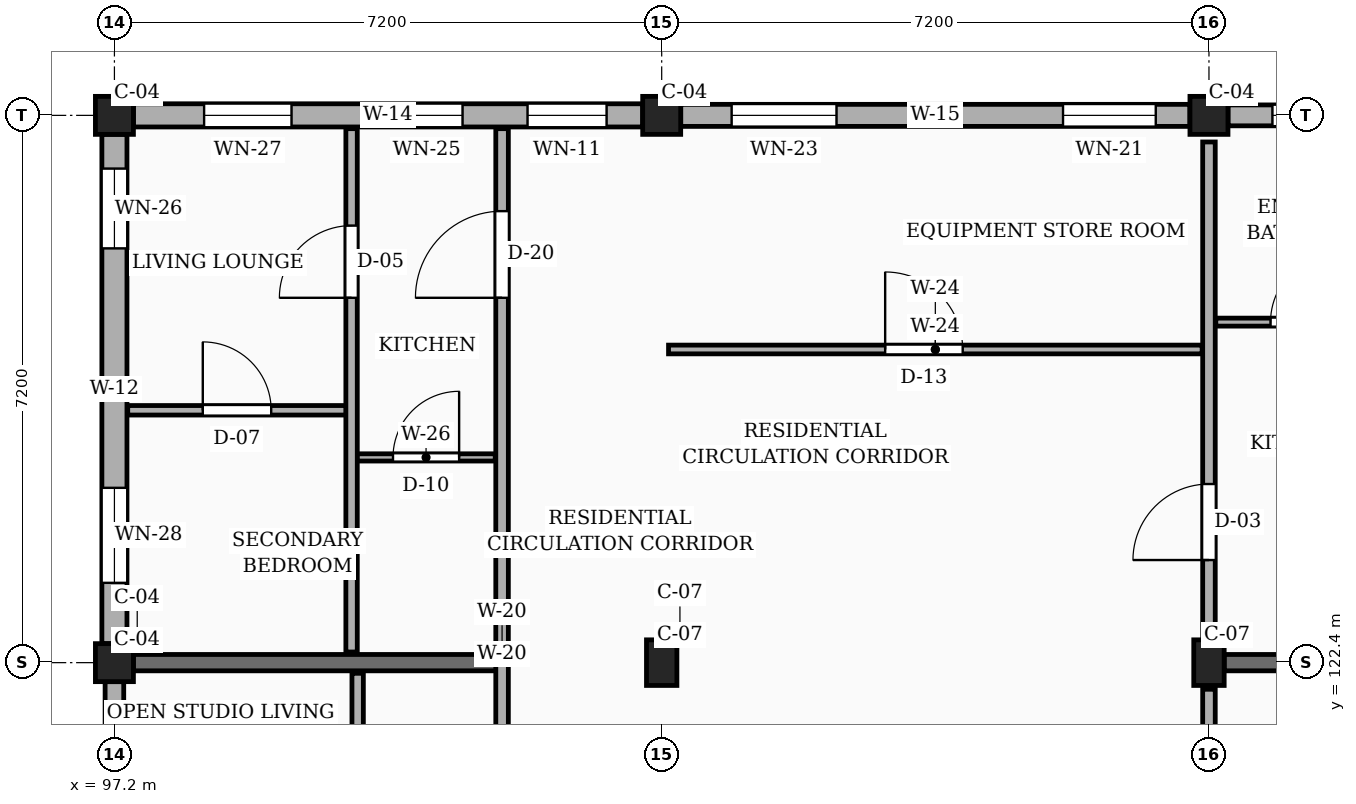
"""IFC4 building model, lengths in metres.
Left out: names, types, materials, properties, quantities, classifications, styles, units other than length and angle.
Written with IfcOpenShell. Run it as: python <this file> out.ifc"""

import sys

from ifc_helpers import new_model, si_unit, direction, frame, frame_2d, origin, origin_2d, place, context, subcontext, project, spatial, rectangle, extrude, element, fill, save


model = new_model("IFC4")
c1 = context("Model", 3, precision=1e-05, world=origin(), true_north=direction((0.0, 1.0)))
c2 = subcontext(c1, "Body", "Model", "MODEL_VIEW")
j1 = project(units=[si_unit("LENGTHUNIT", "METRE"), si_unit("PLANEANGLEUNIT", "RADIAN")], contexts=[c1])
p1 = place(None, origin())
s1 = spatial("IfcSite", under=j1, at=p1, CompositionType="ELEMENT")
p2 = place(p1, origin())
s2 = spatial("IfcBuilding", under=s1, at=p2, CompositionType="ELEMENT")
p3 = place(p2, frame((0.0, 0.0, 29.7)))
s3 = spatial("IfcBuildingStorey", under=s2, at=p3, CompositionType="ELEMENT", Elevation=29.7)
for number, where, z_axis, x_axis in (
    (1, (97.2, 122.4, 0.0), (0.0, 0.0, 1.0), (1.0, 0.0, 0.0)),
    (2, (97.2, 129.6, 0.0), (0.0, 0.0, 1.0), (1.0, 0.0, 0.0)),
):
    element("IfcColumn", number, at=place(p3, frame(where, z_axis=z_axis, x_axis=x_axis)), inside=s3, PredefinedType="COLUMN", context=c2, shape_type="SweptSolid", body=[
        extrude(rectangle(XDim=0.5, YDim=0.5, at=origin_2d()), origin(), (0.0, 0.0, 1.0), 3.15),
    ])
p4 = place(p3, frame((104.4, 122.4, 0.0), z_axis=(0.0, 0.0, 1.0), x_axis=(1.0, 0.0, 0.0)))
e3 = element("IfcColumn", 3, at=p4, inside=s3, PredefinedType="COLUMN", context=c2, shape_type="SweptSolid", body=[
    extrude(rectangle(XDim=0.4, YDim=0.6, at=origin_2d()), origin(), (0.0, 0.0, 1.0), 3.15),
])
p5 = place(p3, frame((104.4, 129.6, 0.0), z_axis=(0.0, 0.0, 1.0), x_axis=(1.0, 0.0, 0.0)))
e4 = element("IfcColumn", 4, at=p5, inside=s3, PredefinedType="COLUMN", context=c2, shape_type="SweptSolid", body=[
    extrude(rectangle(XDim=0.5, YDim=0.5, at=origin_2d()), origin(), (0.0, 0.0, 1.0), 3.15),
])
p6 = place(p3, frame((111.6, 122.4, 0.0), z_axis=(0.0, 0.0, 1.0), x_axis=(1.0, 0.0, 0.0)))
e5 = element("IfcColumn", 5, at=p6, inside=s3, PredefinedType="COLUMN", context=c2, shape_type="SweptSolid", body=[
    extrude(rectangle(XDim=0.4, YDim=0.6, at=origin_2d()), origin(), (0.0, 0.0, 1.0), 3.15),
])
p7 = place(p3, frame((111.6, 129.6, 0.0), z_axis=(0.0, 0.0, 1.0), x_axis=(1.0, 0.0, 0.0)))
e6 = element("IfcColumn", 6, at=p7, inside=s3, PredefinedType="COLUMN", context=c2, shape_type="SweptSolid", body=[
    extrude(rectangle(XDim=0.5, YDim=0.5, at=origin_2d()), origin(), (0.0, 0.0, 1.0), 3.15),
])
p8 = place(p3, frame((97.45, 122.4, 0.0), z_axis=(0.0, 0.0, 1.0), x_axis=(1.0, 0.0, 0.0)))
e7 = element("IfcWall", 7, at=p8, inside=s3, PredefinedType="SOLIDWALL", context=c2, shape_type="SweptSolid", body=[
    extrude(rectangle(XDim=4.85, YDim=0.215, at=frame_2d((2.425, 0.0))), origin(), (0.0, 0.0, 1.0), 2.19),
])
p9 = place(p3, frame((111.8, 122.4, 0.0), z_axis=(0.0, 0.0, 1.0), x_axis=(1.0, 0.0, 0.0)))
e8 = element("IfcWall", 8, at=p9, inside=s3, PredefinedType="SOLIDWALL", context=c2, shape_type="SweptSolid", body=[
    extrude(rectangle(XDim=6.75, YDim=0.215, at=frame_2d((3.375, 0.0))), origin(), (0.0, 0.0, 1.0), 2.19),
])
p10 = place(p3, frame((118.55, 129.6, 0.0), z_axis=(0.0, 0.0, 1.0), x_axis=(-1.0, 0.0, 0.0)))
e9 = element("IfcWall", 9, at=p10, inside=s3, PredefinedType="SOLIDWALL", context=c2, shape_type="SweptSolid", body=[
    extrude(rectangle(XDim=6.7, YDim=0.275, at=frame_2d((3.35, 0.0))), origin(), (0.0, 0.0, 1.0), 2.46),
])
p11 = place(p10, frame((1.765, 0.0, 0.78)))
e10 = element("IfcOpeningElement", 10, at=p11, cuts=e9, PredefinedType="OPENING", context=c2, shape_type="SweptSolid", body=[
    extrude(rectangle(XDim=1.06, YDim=1.36, at=frame_2d((0.53, 0.68))), frame((0.0, 0.147, 0.0), z_axis=(0.0, -1.0, 0.0), x_axis=(1.0, 0.0, 0.0)), (0.0, 0.0, 1.0), 0.295),
])
p12 = place(p10, frame((4.895, 0.0, 0.78)))
e11 = element("IfcOpeningElement", 11, at=p12, cuts=e9, PredefinedType="OPENING", context=c2, shape_type="SweptSolid", body=[
    extrude(rectangle(XDim=1.22, YDim=1.36, at=frame_2d((0.61, 0.68))), frame((0.0, 0.147, 0.0), z_axis=(0.0, -1.0, 0.0), x_axis=(1.0, 0.0, 0.0)), (0.0, 0.0, 1.0), 0.295),
])
p13 = place(p3, frame((111.35, 129.6, 0.0), z_axis=(0.0, 0.0, 1.0), x_axis=(-1.0, 0.0, 0.0)))
e12 = element("IfcWall", 12, at=p13, inside=s3, PredefinedType="SOLIDWALL", context=c2, shape_type="SweptSolid", body=[
    extrude(rectangle(XDim=6.7, YDim=0.29, at=frame_2d((3.35, 0.0))), origin(), (0.0, 0.0, 1.0), 2.46),
])
p14 = place(p13, frame((0.45, 0.0, 0.78)))
e13 = element("IfcOpeningElement", 13, at=p14, cuts=e12, PredefinedType="OPENING", context=c2, shape_type="SweptSolid", body=[
    extrude(rectangle(XDim=1.22, YDim=1.36, at=frame_2d((0.61, 0.68))), frame((0.0, 0.155, 0.0), z_axis=(0.0, -1.0, 0.0), x_axis=(1.0, 0.0, 0.0)), (0.0, 0.0, 1.0), 0.31),
])
p15 = place(p13, frame((4.65, 0.0, 0.78)))
e14 = element("IfcOpeningElement", 14, at=p15, cuts=e12, PredefinedType="OPENING", context=c2, shape_type="SweptSolid", body=[
    extrude(rectangle(XDim=1.38, YDim=1.36, at=frame_2d((0.69, 0.68))), frame((0.0, 0.155, 0.0), z_axis=(0.0, -1.0, 0.0), x_axis=(1.0, 0.0, 0.0)), (0.0, 0.0, 1.0), 0.31),
])
p16 = place(p3, frame((104.15, 129.6, 0.0), z_axis=(0.0, 0.0, 1.0), x_axis=(-1.0, 0.0, 0.0)))
e15 = element("IfcWall", 15, at=p16, inside=s3, PredefinedType="SOLIDWALL", context=c2, shape_type="SweptSolid", body=[
    extrude(rectangle(XDim=6.7, YDim=0.305, at=frame_2d((3.35, 0.0))), origin(), (0.0, 0.0, 1.0), 2.46),
])
p17 = place(p16, frame((0.475, 0.0, 0.78)))
e16 = element("IfcOpeningElement", 16, at=p17, cuts=e15, PredefinedType="OPENING", context=c2, shape_type="SweptSolid", body=[
    extrude(rectangle(XDim=1.04, YDim=1.26, at=frame_2d((0.52, 0.63))), frame((0.0, 0.163, 0.0), z_axis=(0.0, -1.0, 0.0), x_axis=(1.0, 0.0, 0.0)), (0.0, 0.0, 1.0), 0.325),
])
p18 = place(p16, frame((2.37, 0.0, 0.78)))
e17 = element("IfcOpeningElement", 17, at=p18, cuts=e15, PredefinedType="OPENING", context=c2, shape_type="SweptSolid", body=[
    extrude(rectangle(XDim=0.94, YDim=1.44, at=frame_2d((0.47, 0.72))), frame((0.0, 0.163, 0.0), z_axis=(0.0, -1.0, 0.0), x_axis=(1.0, 0.0, 0.0)), (0.0, 0.0, 1.0), 0.325),
])
p19 = place(p16, frame((4.62, 0.0, 0.78)))
e18 = element("IfcOpeningElement", 18, at=p19, cuts=e15, PredefinedType="OPENING", context=c2, shape_type="SweptSolid", body=[
    extrude(rectangle(XDim=1.15, YDim=1.44, at=frame_2d((0.575, 0.72))), frame((0.0, 0.163, 0.0), z_axis=(0.0, -1.0, 0.0), x_axis=(1.0, 0.0, 0.0)), (0.0, 0.0, 1.0), 0.325),
])
p20 = place(p3, frame((97.2, 129.35, 0.0), z_axis=(0.0, 0.0, 1.0), x_axis=(0.0, -1.0, 0.0)))
e19 = element("IfcWall", 19, at=p20, inside=s3, PredefinedType="SOLIDWALL", context=c2, shape_type="SweptSolid", body=[
    extrude(rectangle(XDim=6.7, YDim=0.33, at=frame_2d((3.35, 0.0))), origin(), (0.0, 0.0, 1.0), 2.46),
])
p21 = place(p20, frame((0.45, 0.0, 0.78)))
e20 = element("IfcOpeningElement", 20, at=p21, cuts=e19, PredefinedType="OPENING", context=c2, shape_type="SweptSolid", body=[
    extrude(rectangle(XDim=1.05, YDim=1.44, at=frame_2d((0.525, 0.72))), frame((0.0, 0.175, 0.0), z_axis=(0.0, -1.0, 0.0), x_axis=(1.0, 0.0, 0.0)), (0.0, 0.0, 1.0), 0.35),
])
p22 = place(p20, frame((4.65, 0.0, 0.78)))
e21 = element("IfcOpeningElement", 21, at=p22, cuts=e19, PredefinedType="OPENING", context=c2, shape_type="SweptSolid", body=[
    extrude(rectangle(XDim=1.25, YDim=1.44, at=frame_2d((0.625, 0.72))), frame((0.0, 0.175, 0.0), z_axis=(0.0, -1.0, 0.0), x_axis=(1.0, 0.0, 0.0)), (0.0, 0.0, 1.0), 0.35),
])
p23 = place(p3, frame((97.2, 122.15, 0.0), z_axis=(0.0, 0.0, 1.0), x_axis=(0.0, -1.0, 0.0)))
e22 = element("IfcWall", 22, at=p23, inside=s3, PredefinedType="SOLIDWALL", context=c2, shape_type="SweptSolid", body=[
    extrude(rectangle(XDim=6.7, YDim=0.245, at=frame_2d((3.35, 0.0))), origin(), (0.0, 0.0, 1.0), 2.46),
])
p24 = place(p23, frame((0.45, 0.0, 0.78)))
e23 = element("IfcOpeningElement", 23, at=p24, cuts=e22, PredefinedType="OPENING", context=c2, shape_type="SweptSolid", body=[
    extrude(rectangle(XDim=1.25, YDim=1.44, at=frame_2d((0.625, 0.72))), frame((0.0, 0.133, 0.0), z_axis=(0.0, -1.0, 0.0), x_axis=(1.0, 0.0, 0.0)), (0.0, 0.0, 1.0), 0.265),
])
p25 = place(p23, frame((4.65, 0.0, 0.78)))
e24 = element("IfcOpeningElement", 24, at=p25, cuts=e22, PredefinedType="OPENING", context=c2, shape_type="SweptSolid", body=[
    extrude(rectangle(XDim=1.45, YDim=1.44, at=frame_2d((0.725, 0.72))), frame((0.0, 0.133, 0.0), z_axis=(0.0, -1.0, 0.0), x_axis=(1.0, 0.0, 0.0)), (0.0, 0.0, 1.0), 0.265),
])
p26 = place(p3, frame((102.3, 115.22, 0.0), z_axis=(0.0, 0.0, 1.0), x_axis=(0.0, 1.0, 0.0)))
e25 = element("IfcWall", 25, at=p26, inside=s3, PredefinedType="PARTITIONING", context=c2, shape_type="SweptSolid", body=[
    extrude(rectangle(XDim=7.16, YDim=0.165, at=frame_2d((3.58, 0.0))), origin(), (0.0, 0.0, 1.0), 2.325),
])
p27 = place(p26, frame((4.78, 0.0, 0.0)))
e26 = element("IfcOpeningElement", 26, at=p27, cuts=e25, PredefinedType="OPENING", context=c2, shape_type="SweptSolid", body=[
    extrude(rectangle(XDim=0.94, YDim=2.12, at=frame_2d((0.47, 1.06))), frame((0.0, 0.093, 0.0), z_axis=(0.0, -1.0, 0.0), x_axis=(1.0, 0.0, 0.0)), (0.0, 0.0, 1.0), 0.185),
])
p28 = place(p3, frame((102.3, 122.42, 0.0), z_axis=(0.0, 0.0, 1.0), x_axis=(0.0, 1.0, 0.0)))
e27 = element("IfcWall", 27, at=p28, inside=s3, PredefinedType="PARTITIONING", context=c2, shape_type="SweptSolid", body=[
    extrude(rectangle(XDim=7.005, YDim=0.165, at=frame_2d((3.502, 0.0))), origin(), (0.0, 0.0, 1.0), 2.325),
])
p29 = place(p28, frame((4.78, 0.0, 0.0)))
e28 = element("IfcOpeningElement", 28, at=p29, cuts=e27, PredefinedType="OPENING", context=c2, shape_type="SweptSolid", body=[
    extrude(rectangle(XDim=1.14, YDim=2.18, at=frame_2d((0.57, 1.09))), frame((0.0, 0.093, 0.0), z_axis=(0.0, -1.0, 0.0), x_axis=(1.0, 0.0, 0.0)), (0.0, 0.0, 1.0), 0.185),
])
p30 = place(p3, frame((111.6, 115.55, 0.0), z_axis=(0.0, 0.0, 1.0), x_axis=(0.0, 1.0, 0.0)))
e29 = element("IfcWall", 29, at=p30, inside=s3, PredefinedType="PARTITIONING", context=c2, shape_type="SweptSolid", body=[
    extrude(rectangle(XDim=6.5, YDim=0.165, at=frame_2d((3.25, 0.0))), origin(), (0.0, 0.0, 1.0), 2.325),
])
p31 = place(p30, frame((1.1, 0.0, 0.0)))
e30 = element("IfcOpeningElement", 30, at=p31, cuts=e29, PredefinedType="OPENING", context=c2, shape_type="SweptSolid", body=[
    extrude(rectangle(XDim=1.14, YDim=2.18, at=frame_2d((0.57, 1.09))), frame((0.0, 0.093, 0.0), z_axis=(0.0, -1.0, 0.0), x_axis=(1.0, 0.0, 0.0)), (0.0, 0.0, 1.0), 0.185),
])
p32 = place(p3, frame((111.6, 122.75, 0.0), z_axis=(0.0, 0.0, 1.0), x_axis=(0.0, 1.0, 0.0)))
e31 = element("IfcWall", 31, at=p32, inside=s3, PredefinedType="PARTITIONING", context=c2, shape_type="SweptSolid", body=[
    extrude(rectangle(XDim=6.5, YDim=0.165, at=frame_2d((3.25, 0.0))), origin(), (0.0, 0.0, 1.0), 2.325),
])
p33 = place(p32, frame((1.0, 0.0, 0.0)))
e32 = element("IfcOpeningElement", 32, at=p33, cuts=e31, PredefinedType="OPENING", context=c2, shape_type="SweptSolid", body=[
    extrude(rectangle(XDim=1.0, YDim=2.15, at=frame_2d((0.5, 1.075))), frame((0.0, 0.093, 0.0), z_axis=(0.0, -1.0, 0.0), x_axis=(1.0, 0.0, 0.0)), (0.0, 0.0, 1.0), 0.185),
])
p34 = place(p3, frame((100.4, 115.34, 0.0), z_axis=(0.0, 0.0, 1.0), x_axis=(0.0, 1.0, 0.0)))
e33 = element("IfcWall", 33, at=p34, inside=s3, PredefinedType="PARTITIONING", context=c2, shape_type="SweptSolid", body=[
    extrude(rectangle(XDim=6.92, YDim=0.15, at=frame_2d((3.46, 0.0))), origin(), (0.0, 0.0, 1.0), 2.325),
])
p35 = place(p34, frame((4.66, 0.0, 0.0)))
e34 = element("IfcOpeningElement", 34, at=p35, cuts=e33, PredefinedType="OPENING", context=c2, shape_type="SweptSolid", body=[
    extrude(rectangle(XDim=0.92, YDim=2.1, at=frame_2d((0.46, 1.05))), frame((0.0, 0.085, 0.0), z_axis=(0.0, -1.0, 0.0), x_axis=(1.0, 0.0, 0.0)), (0.0, 0.0, 1.0), 0.17),
])
p36 = place(p3, frame((104.49, 126.52, 0.0), z_axis=(0.0, 0.0, 1.0), x_axis=(1.0, 0.0, 0.0)))
e35 = element("IfcWall", 35, at=p36, inside=s3, PredefinedType="PARTITIONING", context=c2, shape_type="SweptSolid", body=[
    extrude(rectangle(XDim=7.02, YDim=0.115, at=frame_2d((3.51, 0.0))), origin(), (0.0, 0.0, 1.0), 2.325),
])
p37 = place(p36, frame((2.85, 0.0, 0.0)))
e36 = element("IfcOpeningElement", 36, at=p37, cuts=e35, PredefinedType="OPENING", context=c2, shape_type="SweptSolid", body=[
    extrude(rectangle(XDim=1.02, YDim=2.15, at=frame_2d((0.51, 1.075))), frame((0.0, 0.067, 0.0), z_axis=(0.0, -1.0, 0.0), x_axis=(1.0, 0.0, 0.0)), (0.0, 0.0, 1.0), 0.135),
])
p38 = place(p3, frame((97.375, 125.72, 0.0), z_axis=(0.0, 0.0, 1.0), x_axis=(1.0, 0.0, 0.0)))
e37 = element("IfcWall", 37, at=p38, inside=s3, PredefinedType="PARTITIONING", context=c2, shape_type="SweptSolid", body=[
    extrude(rectangle(XDim=2.875, YDim=0.125, at=frame_2d((1.438, 0.0))), origin(), (0.0, 0.0, 1.0), 2.325),
])
p39 = place(p38, frame((0.988, 0.0, 0.0)))
e38 = element("IfcOpeningElement", 38, at=p39, cuts=e37, PredefinedType="OPENING", context=c2, shape_type="SweptSolid", body=[
    extrude(rectangle(XDim=0.9, YDim=2.1, at=frame_2d((0.45, 1.05))), frame((0.0, 0.073, 0.0), z_axis=(0.0, -1.0, 0.0), x_axis=(1.0, 0.0, 0.0)), (0.0, 0.0, 1.0), 0.145),
])
p40 = place(p3, frame((100.39, 125.1, 0.0), z_axis=(0.0, 0.0, 1.0), x_axis=(1.0, 0.0, 0.0)))
e39 = element("IfcWall", 39, at=p40, inside=s3, PredefinedType="PARTITIONING", context=c2, shape_type="SweptSolid", body=[
    extrude(rectangle(XDim=1.82, YDim=0.095, at=frame_2d((0.91, 0.0))), origin(), (0.0, 0.0, 1.0), 2.325),
])
p41 = place(p40, frame((0.475, 0.0, 0.0)))
e40 = element("IfcOpeningElement", 40, at=p41, cuts=e39, PredefinedType="OPENING", context=c2, shape_type="SweptSolid", body=[
    extrude(rectangle(XDim=0.87, YDim=2.05, at=frame_2d((0.435, 1.025))), frame((0.0, 0.058, 0.0), z_axis=(0.0, -1.0, 0.0), x_axis=(1.0, 0.0, 0.0)), (0.0, 0.0, 1.0), 0.115),
])
p42 = place(p3, frame((100.32, 122.54, 0.0), z_axis=(0.0, 0.0, 1.0), x_axis=(0.0, 1.0, 0.0)))
e41 = element("IfcWall", 41, at=p42, inside=s3, PredefinedType="PARTITIONING", context=c2, shape_type="SweptSolid", body=[
    extrude(rectangle(XDim=6.885, YDim=0.15, at=frame_2d((3.442, 0.0))), origin(), (0.0, 0.0, 1.0), 2.325),
])
p43 = place(p42, frame((4.66, 0.0, 0.0)))
e42 = element("IfcOpeningElement", 42, at=p43, cuts=e41, PredefinedType="OPENING", context=c2, shape_type="SweptSolid", body=[
    extrude(rectangle(XDim=0.95, YDim=2.1, at=frame_2d((0.475, 1.05))), frame((0.0, 0.085, 0.0), z_axis=(0.0, -1.0, 0.0), x_axis=(1.0, 0.0, 0.0)), (0.0, 0.0, 1.0), 0.17),
])
p44 = place(p3, frame((111.69, 126.88, 0.0), z_axis=(0.0, 0.0, 1.0), x_axis=(1.0, 0.0, 0.0)))
e43 = element("IfcWall", 43, at=p44, inside=s3, PredefinedType="PARTITIONING", context=c2, shape_type="SweptSolid", body=[
    extrude(rectangle(XDim=2.34, YDim=0.105, at=frame_2d((1.17, 0.0))), origin(), (0.0, 0.0, 1.0), 2.325),
])
p45 = place(p44, frame((0.72, 0.0, 0.0)))
e44 = element("IfcOpeningElement", 44, at=p45, cuts=e43, PredefinedType="OPENING", context=c2, shape_type="SweptSolid", body=[
    extrude(rectangle(XDim=0.9, YDim=2.05, at=frame_2d((0.45, 1.025))), frame((0.0, 0.062, 0.0), z_axis=(0.0, -1.0, 0.0), x_axis=(1.0, 0.0, 0.0)), (0.0, 0.0, 1.0), 0.125),
])
p46 = place(p12, origin())
e45 = element("IfcWindow", 45, at=p46, inside=s3, PartitioningType="SINGLE_PANEL", PredefinedType="WINDOW", context=c2, shape_type="SweptSolid", body=[
    extrude(rectangle(XDim=1.22, YDim=1.36, at=frame_2d((0.61, 0.68))), frame((0.0, 0.03, 0.0), z_axis=(0.0, -1.0, 0.0), x_axis=(1.0, 0.0, 0.0)), (0.0, 0.0, 1.0), 0.06),
])
fill(e11, e45)
p47 = place(p14, origin())
e46 = element("IfcWindow", 46, at=p47, inside=s3, PartitioningType="SINGLE_PANEL", PredefinedType="WINDOW", context=c2, shape_type="SweptSolid", body=[
    extrude(rectangle(XDim=1.22, YDim=1.36, at=frame_2d((0.61, 0.68))), frame((0.0, 0.03, 0.0), z_axis=(0.0, -1.0, 0.0), x_axis=(1.0, 0.0, 0.0)), (0.0, 0.0, 1.0), 0.06),
])
fill(e13, e46)
p48 = place(p15, origin())
e47 = element("IfcWindow", 47, at=p48, inside=s3, PartitioningType="SINGLE_PANEL", PredefinedType="WINDOW", context=c2, shape_type="SweptSolid", body=[
    extrude(rectangle(XDim=1.38, YDim=1.36, at=frame_2d((0.69, 0.68))), frame((0.0, 0.03, 0.0), z_axis=(0.0, -1.0, 0.0), x_axis=(1.0, 0.0, 0.0)), (0.0, 0.0, 1.0), 0.06),
])
fill(e14, e47)
p49 = place(p17, origin())
e48 = element("IfcWindow", 48, at=p49, inside=s3, PartitioningType="SINGLE_PANEL", PredefinedType="WINDOW", context=c2, shape_type="SweptSolid", body=[
    extrude(rectangle(XDim=1.04, YDim=1.26, at=frame_2d((0.52, 0.63))), frame((0.0, 0.03, 0.0), z_axis=(0.0, -1.0, 0.0), x_axis=(1.0, 0.0, 0.0)), (0.0, 0.0, 1.0), 0.06),
])
fill(e16, e48)
p50 = place(p18, origin())
e49 = element("IfcWindow", 49, at=p50, inside=s3, PartitioningType="SINGLE_PANEL", PredefinedType="WINDOW", context=c2, shape_type="SweptSolid", body=[
    extrude(rectangle(XDim=0.94, YDim=1.44, at=frame_2d((0.47, 0.72))), frame((0.0, 0.03, 0.0), z_axis=(0.0, -1.0, 0.0), x_axis=(1.0, 0.0, 0.0)), (0.0, 0.0, 1.0), 0.06),
])
fill(e17, e49)
p51 = place(p19, origin())
e50 = element("IfcWindow", 50, at=p51, inside=s3, PartitioningType="SINGLE_PANEL", PredefinedType="WINDOW", context=c2, shape_type="SweptSolid", body=[
    extrude(rectangle(XDim=1.15, YDim=1.44, at=frame_2d((0.575, 0.72))), frame((0.0, 0.03, 0.0), z_axis=(0.0, -1.0, 0.0), x_axis=(1.0, 0.0, 0.0)), (0.0, 0.0, 1.0), 0.06),
])
fill(e18, e50)
p52 = place(p21, origin())
e51 = element("IfcWindow", 51, at=p52, inside=s3, PartitioningType="SINGLE_PANEL", PredefinedType="WINDOW", context=c2, shape_type="SweptSolid", body=[
    extrude(rectangle(XDim=1.05, YDim=1.44, at=frame_2d((0.525, 0.72))), frame((0.0, 0.03, 0.0), z_axis=(0.0, -1.0, 0.0), x_axis=(1.0, 0.0, 0.0)), (0.0, 0.0, 1.0), 0.06),
])
fill(e20, e51)
p53 = place(p22, origin())
e52 = element("IfcWindow", 52, at=p53, inside=s3, PartitioningType="SINGLE_PANEL", PredefinedType="WINDOW", context=c2, shape_type="SweptSolid", body=[
    extrude(rectangle(XDim=1.25, YDim=1.44, at=frame_2d((0.625, 0.72))), frame((0.0, 0.03, 0.0), z_axis=(0.0, -1.0, 0.0), x_axis=(1.0, 0.0, 0.0)), (0.0, 0.0, 1.0), 0.06),
])
fill(e21, e52)
p54 = place(p24, origin())
e53 = element("IfcWindow", 53, at=p54, inside=s3, PartitioningType="SINGLE_PANEL", PredefinedType="WINDOW", context=c2, shape_type="SweptSolid", body=[
    extrude(rectangle(XDim=1.25, YDim=1.44, at=frame_2d((0.625, 0.72))), frame((0.0, 0.03, 0.0), z_axis=(0.0, -1.0, 0.0), x_axis=(1.0, 0.0, 0.0)), (0.0, 0.0, 1.0), 0.06),
])
fill(e23, e53)
p55 = place(p29, origin())
e54 = element("IfcDoor", 54, at=p55, inside=s3, OperationType="SINGLE_SWING_LEFT", PredefinedType="DOOR", context=c2, shape_type="SweptSolid", body=[
    extrude(rectangle(XDim=1.14, YDim=2.18, at=frame_2d((0.57, 1.09))), frame((0.0, 0.025, 0.0), z_axis=(0.0, -1.0, 0.0), x_axis=(1.0, 0.0, 0.0)), (0.0, 0.0, 1.0), 0.05),
])
fill(e28, e54)
p56 = place(p33, origin())
e55 = element("IfcDoor", 55, at=p56, inside=s3, OperationType="SINGLE_SWING_LEFT", PredefinedType="DOOR", context=c2, shape_type="SweptSolid", body=[
    extrude(rectangle(XDim=1.0, YDim=2.15, at=frame_2d((0.5, 1.075))), frame((0.0, 0.025, 0.0), z_axis=(0.0, -1.0, 0.0), x_axis=(1.0, 0.0, 0.0)), (0.0, 0.0, 1.0), 0.05),
])
fill(e32, e55)
p57 = place(p37, origin())
e56 = element("IfcDoor", 56, at=p57, inside=s3, OperationType="SINGLE_SWING_LEFT", PredefinedType="DOOR", context=c2, shape_type="SweptSolid", body=[
    extrude(rectangle(XDim=1.02, YDim=2.15, at=frame_2d((0.51, 1.075))), frame((0.0, 0.025, 0.0), z_axis=(0.0, -1.0, 0.0), x_axis=(1.0, 0.0, 0.0)), (0.0, 0.0, 1.0), 0.05),
])
fill(e36, e56)
p58 = place(p39, origin())
e57 = element("IfcDoor", 57, at=p58, inside=s3, OperationType="SINGLE_SWING_LEFT", PredefinedType="DOOR", context=c2, shape_type="SweptSolid", body=[
    extrude(rectangle(XDim=0.9, YDim=2.1, at=frame_2d((0.45, 1.05))), frame((0.0, 0.025, 0.0), z_axis=(0.0, -1.0, 0.0), x_axis=(1.0, 0.0, 0.0)), (0.0, 0.0, 1.0), 0.05),
])
fill(e38, e57)
p59 = place(p41, origin())
e58 = element("IfcDoor", 58, at=p59, inside=s3, OperationType="SINGLE_SWING_RIGHT", PredefinedType="DOOR", context=c2, shape_type="SweptSolid", body=[
    extrude(rectangle(XDim=0.87, YDim=2.05, at=frame_2d((0.435, 1.025))), frame((0.0, 0.025, 0.0), z_axis=(0.0, -1.0, 0.0), x_axis=(1.0, 0.0, 0.0)), (0.0, 0.0, 1.0), 0.05),
])
fill(e40, e58)
p60 = place(p43, origin())
e59 = element("IfcDoor", 59, at=p60, inside=s3, OperationType="SINGLE_SWING_LEFT", PredefinedType="DOOR", context=c2, shape_type="SweptSolid", body=[
    extrude(rectangle(XDim=0.95, YDim=2.1, at=frame_2d((0.475, 1.05))), frame((0.0, 0.025, 0.0), z_axis=(0.0, -1.0, 0.0), x_axis=(1.0, 0.0, 0.0)), (0.0, 0.0, 1.0), 0.05),
])
fill(e42, e59)
p61 = place(p45, origin())
e60 = element("IfcDoor", 60, at=p61, inside=s3, OperationType="SINGLE_SWING_RIGHT", PredefinedType="DOOR", context=c2, shape_type="SweptSolid", body=[
    extrude(rectangle(XDim=0.9, YDim=2.05, at=frame_2d((0.45, 1.025))), frame((0.0, 0.025, 0.0), z_axis=(0.0, -1.0, 0.0), x_axis=(1.0, 0.0, 0.0)), (0.0, 0.0, 1.0), 0.05),
])
fill(e44, e60)
save(model, sys.argv[1])
